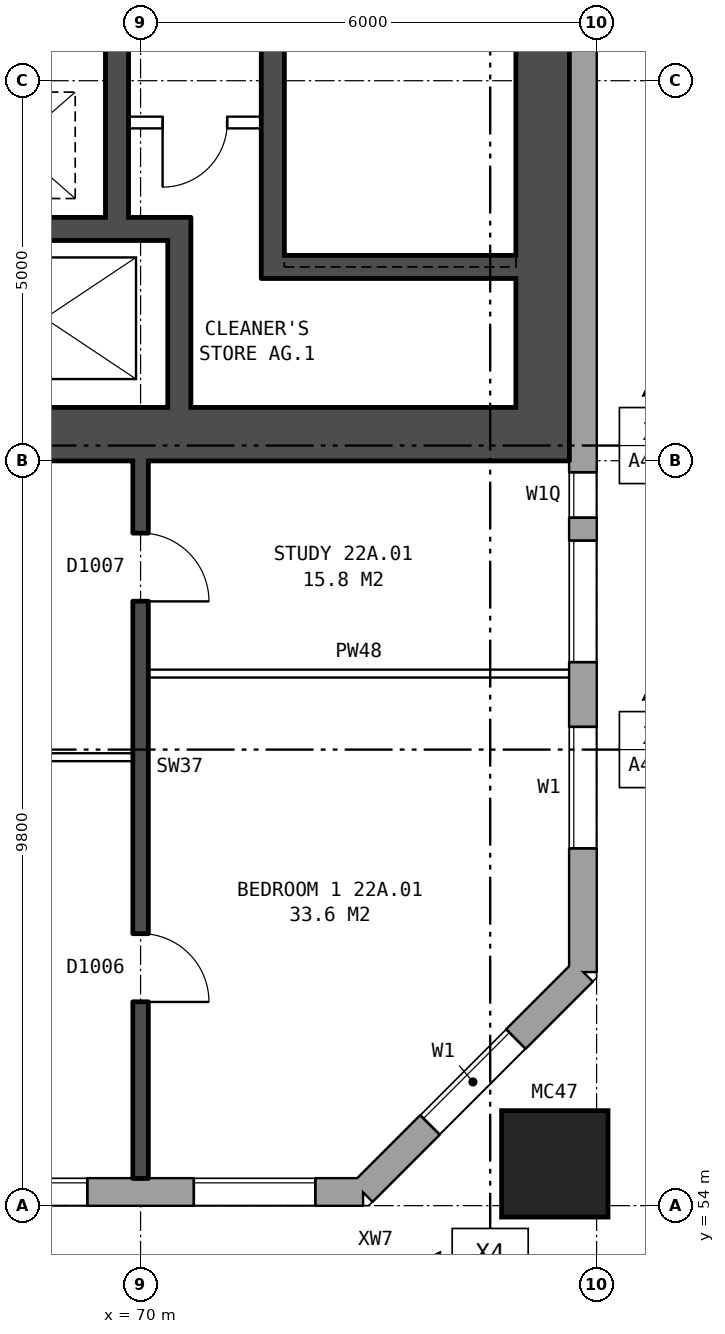
"""IFC4 building model, lengths in metres.
Left out: names, types, materials, properties, quantities, classifications, styles, units other than length and angle.
Written with IfcOpenShell. Run it as: python <this file> out.ifc"""

import sys

from ifc_helpers import new_model, si_unit, direction, frame, frame_2d, origin, origin_2d, place, context, subcontext, project, spatial, rectangle, hollow_rectangle, extrude, element, fill, save


model = new_model("IFC4")
c1 = context("Model", 3, precision=1e-05, world=origin(), true_north=direction((0.0, 1.0)))
c2 = subcontext(c1, "Body", "Model", "MODEL_VIEW")
j1 = project(units=[si_unit("LENGTHUNIT", "METRE"), si_unit("PLANEANGLEUNIT", "RADIAN")], contexts=[c1])
p1 = place(None, origin())
s1 = spatial("IfcSite", under=j1, at=p1, CompositionType="ELEMENT")
p2 = place(p1, origin())
s2 = spatial("IfcBuilding", under=s1, at=p2, CompositionType="ELEMENT")
p3 = place(p2, frame((0.0, 0.0, 80.9)))
s3 = spatial("IfcBuildingStorey", under=s2, at=p3, CompositionType="ELEMENT", Elevation=80.9)
p4 = place(p3, frame((75.45, 54.55, 0.0), z_axis=(0.0, 0.0, 1.0), x_axis=(1.0, 0.0, 0.0)))
e1 = element("IfcColumn", 1, at=p4, inside=s3, PredefinedType="COLUMN", context=c2, shape_type="SweptSolid", body=[
    extrude(hollow_rectangle(XDim=1.4, YDim=1.4, WallThickness=0.075, at=origin_2d()), origin(), (0.0, 0.0, 1.0), 3.1),
])
p5 = place(p3, frame((26.325, 54.18, 0.0), z_axis=(0.0, 0.0, 1.0), x_axis=(1.0, 0.0, 0.0)))
e2 = element("IfcWall", 2, at=p5, inside=s3, PredefinedType="STANDARD", context=c2, shape_type="SweptSolid", body=[
    extrude(rectangle(XDim=46.601, YDim=0.36, at=frame_2d((23.3, 0.0))), origin(), (0.0, 0.0, 1.0), 2.85),
])
p6 = place(p5, frame((2.375, 0.0, 0.8)))
e3 = element("IfcOpeningElement", 3, at=p6, cuts=e2, PredefinedType="OPENING", context=c2, shape_type="SweptSolid", body=[
    extrude(rectangle(XDim=1.6, YDim=1.8, at=frame_2d((0.8, 0.9))), frame((0.0, 0.19, 0.0), z_axis=(0.0, -1.0, 0.0), x_axis=(1.0, 0.0, 0.0)), (0.0, 0.0, 1.0), 0.38),
])
p7 = place(p5, frame((5.375, 0.0, 0.8)))
e4 = element("IfcOpeningElement", 4, at=p7, cuts=e2, PredefinedType="OPENING", context=c2, shape_type="SweptSolid", body=[
    extrude(rectangle(XDim=1.6, YDim=1.8, at=frame_2d((0.8, 0.9))), frame((0.0, 0.19, 0.0), z_axis=(0.0, -1.0, 0.0), x_axis=(1.0, 0.0, 0.0)), (0.0, 0.0, 1.0), 0.38),
])
p8 = place(p5, frame((8.375, 0.0, 0.8)))
e5 = element("IfcOpeningElement", 5, at=p8, cuts=e2, PredefinedType="OPENING", context=c2, shape_type="SweptSolid", body=[
    extrude(rectangle(XDim=1.6, YDim=1.8, at=frame_2d((0.8, 0.9))), frame((0.0, 0.19, 0.0), z_axis=(0.0, -1.0, 0.0), x_axis=(1.0, 0.0, 0.0)), (0.0, 0.0, 1.0), 0.38),
])
p9 = place(p5, frame((11.375, 0.0, 0.8)))
e6 = element("IfcOpeningElement", 6, at=p9, cuts=e2, PredefinedType="OPENING", context=c2, shape_type="SweptSolid", body=[
    extrude(rectangle(XDim=1.6, YDim=1.8, at=frame_2d((0.8, 0.9))), frame((0.0, 0.19, 0.0), z_axis=(0.0, -1.0, 0.0), x_axis=(1.0, 0.0, 0.0)), (0.0, 0.0, 1.0), 0.38),
])
p10 = place(p5, frame((15.875, 0.0, 0.8)))
e7 = element("IfcOpeningElement", 7, at=p10, cuts=e2, PredefinedType="OPENING", context=c2, shape_type="SweptSolid", body=[
    extrude(rectangle(XDim=1.2, YDim=1.2, at=frame_2d((0.6, 0.6))), frame((0.0, 0.19, 0.0), z_axis=(0.0, -1.0, 0.0), x_axis=(1.0, 0.0, 0.0)), (0.0, 0.0, 1.0), 0.38),
])
p11 = place(p5, frame((17.375, 0.0, 0.8)))
e8 = element("IfcOpeningElement", 8, at=p11, cuts=e2, PredefinedType="OPENING", context=c2, shape_type="SweptSolid", body=[
    extrude(rectangle(XDim=1.6, YDim=1.8, at=frame_2d((0.8, 0.9))), frame((0.0, 0.19, 0.0), z_axis=(0.0, -1.0, 0.0), x_axis=(1.0, 0.0, 0.0)), (0.0, 0.0, 1.0), 0.38),
])
p12 = place(p5, frame((20.375, 0.0, 0.8)))
e9 = element("IfcOpeningElement", 9, at=p12, cuts=e2, PredefinedType="OPENING", context=c2, shape_type="SweptSolid", body=[
    extrude(rectangle(XDim=1.6, YDim=1.8, at=frame_2d((0.8, 0.9))), frame((0.0, 0.19, 0.0), z_axis=(0.0, -1.0, 0.0), x_axis=(1.0, 0.0, 0.0)), (0.0, 0.0, 1.0), 0.38),
])
p13 = place(p5, frame((23.375, 0.0, 0.8)))
e10 = element("IfcOpeningElement", 10, at=p13, cuts=e2, PredefinedType="OPENING", context=c2, shape_type="SweptSolid", body=[
    extrude(rectangle(XDim=1.6, YDim=1.8, at=frame_2d((0.8, 0.9))), frame((0.0, 0.19, 0.0), z_axis=(0.0, -1.0, 0.0), x_axis=(1.0, 0.0, 0.0)), (0.0, 0.0, 1.0), 0.38),
])
p14 = place(p5, frame((26.375, 0.0, 0.8)))
e11 = element("IfcOpeningElement", 11, at=p14, cuts=e2, PredefinedType="OPENING", context=c2, shape_type="SweptSolid", body=[
    extrude(rectangle(XDim=1.6, YDim=1.8, at=frame_2d((0.8, 0.9))), frame((0.0, 0.19, 0.0), z_axis=(0.0, -1.0, 0.0), x_axis=(1.0, 0.0, 0.0)), (0.0, 0.0, 1.0), 0.38),
])
p15 = place(p5, frame((28.825, 0.0, 0.8)))
e12 = element("IfcOpeningElement", 12, at=p15, cuts=e2, PredefinedType="OPENING", context=c2, shape_type="SweptSolid", body=[
    extrude(rectangle(XDim=1.2, YDim=1.8, at=frame_2d((0.6, 0.9))), frame((0.0, 0.19, 0.0), z_axis=(0.0, -1.0, 0.0), x_axis=(1.0, 0.0, 0.0)), (0.0, 0.0, 1.0), 0.38),
])
p16 = place(p5, frame((32.375, 0.0, 1.7)))
e13 = element("IfcOpeningElement", 13, at=p16, cuts=e2, PredefinedType="OPENING", context=c2, shape_type="SweptSolid", body=[
    extrude(rectangle(XDim=0.8, YDim=0.9, at=frame_2d((0.4, 0.45))), frame((0.0, 0.19, 0.0), z_axis=(0.0, -1.0, 0.0), x_axis=(1.0, 0.0, 0.0)), (0.0, 0.0, 1.0), 0.38),
])
p17 = place(p5, frame((35.375, 0.0, 0.8)))
e14 = element("IfcOpeningElement", 14, at=p17, cuts=e2, PredefinedType="OPENING", context=c2, shape_type="SweptSolid", body=[
    extrude(rectangle(XDim=1.6, YDim=1.8, at=frame_2d((0.8, 0.9))), frame((0.0, 0.19, 0.0), z_axis=(0.0, -1.0, 0.0), x_axis=(1.0, 0.0, 0.0)), (0.0, 0.0, 1.0), 0.38),
])
p18 = place(p5, frame((38.375, 0.0, 0.8)))
e15 = element("IfcOpeningElement", 15, at=p18, cuts=e2, PredefinedType="OPENING", context=c2, shape_type="SweptSolid", body=[
    extrude(rectangle(XDim=1.6, YDim=1.8, at=frame_2d((0.8, 0.9))), frame((0.0, 0.19, 0.0), z_axis=(0.0, -1.0, 0.0), x_axis=(1.0, 0.0, 0.0)), (0.0, 0.0, 1.0), 0.38),
])
p19 = place(p5, frame((41.375, 0.0, 0.8)))
e16 = element("IfcOpeningElement", 16, at=p19, cuts=e2, PredefinedType="OPENING", context=c2, shape_type="SweptSolid", body=[
    extrude(rectangle(XDim=1.6, YDim=1.8, at=frame_2d((0.8, 0.9))), frame((0.0, 0.19, 0.0), z_axis=(0.0, -1.0, 0.0), x_axis=(1.0, 0.0, 0.0)), (0.0, 0.0, 1.0), 0.38),
])
p20 = place(p5, frame((44.375, 0.0, 0.8)))
e17 = element("IfcOpeningElement", 17, at=p20, cuts=e2, PredefinedType="OPENING", context=c2, shape_type="SweptSolid", body=[
    extrude(rectangle(XDim=1.6, YDim=1.8, at=frame_2d((0.8, 0.9))), frame((0.0, 0.19, 0.0), z_axis=(0.0, -1.0, 0.0), x_axis=(1.0, 0.0, 0.0)), (0.0, 0.0, 1.0), 0.38),
])
p21 = place(p5, frame((30.325, 0.0, 0.8)))
e18 = element("IfcOpeningElement", 18, at=p21, cuts=e2, PredefinedType="OPENING", context=c2, shape_type="SweptSolid", body=[
    extrude(rectangle(XDim=0.6, YDim=0.9, at=frame_2d((0.3, 0.45))), frame((0.0, 0.19, 0.0), z_axis=(0.0, -1.0, 0.0), x_axis=(1.0, 0.0, 0.0)), (0.0, 0.0, 1.0), 0.38),
])
p22 = place(p5, frame((33.475, 0.0, 0.8)))
e19 = element("IfcOpeningElement", 19, at=p22, cuts=e2, PredefinedType="OPENING", context=c2, shape_type="SweptSolid", body=[
    extrude(rectangle(XDim=1.0, YDim=1.8, at=frame_2d((0.5, 0.9))), frame((0.0, 0.19, 0.0), z_axis=(0.0, -1.0, 0.0), x_axis=(1.0, 0.0, 0.0)), (0.0, 0.0, 1.0), 0.38),
])
p23 = place(p3, frame((72.925, 54.18, 0.0), z_axis=(0.0, 0.0, 1.0), x_axis=(0.707106781187, 0.707106781187, 0.0)))
e20 = element("IfcWall", 20, at=p23, inside=s3, PredefinedType="STANDARD", context=c2, shape_type="SweptSolid", body=[
    extrude(rectangle(XDim=4.094, YDim=0.36, at=frame_2d((2.047, 0.0))), origin(), (0.0, 0.0, 1.0), 2.85),
])
p24 = place(p23, frame((1.247, 0.0, 0.8)))
e21 = element("IfcOpeningElement", 21, at=p24, cuts=e20, PredefinedType="OPENING", context=c2, shape_type="SweptSolid", body=[
    extrude(rectangle(XDim=1.6, YDim=1.8, at=frame_2d((0.8, 0.9))), frame((0.0, 0.19, 0.0), z_axis=(0.0, -1.0, 0.0), x_axis=(1.0, 0.0, 0.0)), (0.0, 0.0, 1.0), 0.38),
])
p25 = place(p3, frame((75.82, 57.075, 0.0), z_axis=(0.0, 0.0, 1.0), x_axis=(0.0, 1.0, 0.0)))
e22 = element("IfcWall", 22, at=p25, inside=s3, PredefinedType="STANDARD", context=c2, shape_type="SweptSolid", body=[
    extrude(rectangle(XDim=25.851, YDim=0.36, at=frame_2d((12.925, 0.0))), origin(), (0.0, 0.0, 1.0), 2.85),
])
p26 = place(p25, frame((1.625, 0.0, 0.8)))
e23 = element("IfcOpeningElement", 23, at=p26, cuts=e22, PredefinedType="OPENING", context=c2, shape_type="SweptSolid", body=[
    extrude(rectangle(XDim=1.6, YDim=1.8, at=frame_2d((0.8, 0.9))), frame((0.0, 0.19, 0.0), z_axis=(0.0, -1.0, 0.0), x_axis=(1.0, 0.0, 0.0)), (0.0, 0.0, 1.0), 0.38),
])
p27 = place(p25, frame((4.075, 0.0, 0.8)))
e24 = element("IfcOpeningElement", 24, at=p27, cuts=e22, PredefinedType="OPENING", context=c2, shape_type="SweptSolid", body=[
    extrude(rectangle(XDim=1.6, YDim=1.8, at=frame_2d((0.8, 0.9))), frame((0.0, 0.19, 0.0), z_axis=(0.0, -1.0, 0.0), x_axis=(1.0, 0.0, 0.0)), (0.0, 0.0, 1.0), 0.38),
])
p28 = place(p25, frame((19.225, 0.0, 0.8)))
e25 = element("IfcOpeningElement", 25, at=p28, cuts=e22, PredefinedType="OPENING", context=c2, shape_type="SweptSolid", body=[
    extrude(rectangle(XDim=0.6, YDim=1.2, at=frame_2d((0.3, 0.6))), frame((0.0, 0.19, 0.0), z_axis=(0.0, -1.0, 0.0), x_axis=(1.0, 0.0, 0.0)), (0.0, 0.0, 1.0), 0.38),
])
p29 = place(p25, frame((22.625, 0.0, 0.8)))
e26 = element("IfcOpeningElement", 26, at=p29, cuts=e22, PredefinedType="OPENING", context=c2, shape_type="SweptSolid", body=[
    extrude(rectangle(XDim=1.6, YDim=1.8, at=frame_2d((0.8, 0.9))), frame((0.0, 0.19, 0.0), z_axis=(0.0, -1.0, 0.0), x_axis=(1.0, 0.0, 0.0)), (0.0, 0.0, 1.0), 0.38),
])
p30 = place(p25, frame((5.975, 0.0, 0.8)))
e27 = element("IfcOpeningElement", 27, at=p30, cuts=e22, PredefinedType="OPENING", context=c2, shape_type="SweptSolid", body=[
    extrude(rectangle(XDim=0.6, YDim=1.2, at=frame_2d((0.3, 0.6))), frame((0.0, 0.19, 0.0), z_axis=(0.0, -1.0, 0.0), x_axis=(1.0, 0.0, 0.0)), (0.0, 0.0, 1.0), 0.38),
])
p31 = place(p25, frame((20.125, 0.0, 0.8)))
e28 = element("IfcOpeningElement", 28, at=p31, cuts=e22, PredefinedType="OPENING", context=c2, shape_type="SweptSolid", body=[
    extrude(rectangle(XDim=1.6, YDim=1.8, at=frame_2d((0.8, 0.9))), frame((0.0, 0.19, 0.0), z_axis=(0.0, -1.0, 0.0), x_axis=(1.0, 0.0, 0.0)), (0.0, 0.0, 1.0), 0.38),
])
p32 = place(p3, frame((75.29, 64.5, 0.0), z_axis=(0.0, 0.0, 1.0), x_axis=(0.0, 1.0, 0.0)))
e29 = element("IfcWall", 29, at=p32, inside=s3, PredefinedType="SHEAR", context=c2, shape_type="SweptSolid", body=[
    extrude(rectangle(XDim=11.0, YDim=0.7, at=frame_2d((5.5, 0.0))), origin(), (0.0, 0.0, 1.0), 2.85),
])
p33 = place(p3, frame((66.64, 64.15, 0.0), z_axis=(0.0, 0.0, 1.0), x_axis=(1.0, 0.0, 0.0)))
e30 = element("IfcWall", 30, at=p33, inside=s3, PredefinedType="SHEAR", context=c2, shape_type="SweptSolid", body=[
    extrude(rectangle(XDim=9.0, YDim=0.7, at=frame_2d((4.5, 0.0))), origin(), (0.0, 0.0, 1.0), 2.85),
])
p34 = place(p3, frame((71.89, 66.35, 0.0), z_axis=(0.0, 0.0, 1.0), x_axis=(1.0, 0.0, 0.0)))
e31 = element("IfcWall", 31, at=p34, inside=s3, PredefinedType="SHEAR", context=c2, shape_type="SweptSolid", body=[
    extrude(rectangle(XDim=3.05, YDim=0.3, at=frame_2d((1.525, 0.0))), origin(), (0.0, 0.0, 1.0), 2.85),
])
p35 = place(p3, frame((67.34, 66.85, 0.0), z_axis=(0.0, 0.0, 1.0), x_axis=(1.0, 0.0, 0.0)))
e32 = element("IfcWall", 32, at=p35, inside=s3, PredefinedType="SHEAR", context=c2, shape_type="SweptSolid", body=[
    extrude(rectangle(XDim=3.32, YDim=0.3, at=frame_2d((1.66, 0.0))), origin(), (0.0, 0.0, 1.0), 2.85),
])
p36 = place(p3, frame((69.84, 68.25, 0.0), z_axis=(0.0, 0.0, 1.0), x_axis=(1.0, 0.0, 0.0)))
e33 = element("IfcWall", 33, at=p36, inside=s3, PredefinedType="PARTITIONING", context=c2, shape_type="SweptSolid", body=[
    extrude(rectangle(XDim=1.75, YDim=0.15, at=frame_2d((0.875, 0.0))), origin(), (0.0, 0.0, 1.0), 2.85),
])
p37 = place(p36, frame((0.45, 0.0, 0.0)))
e34 = element("IfcOpeningElement", 34, at=p37, cuts=e33, PredefinedType="OPENING", context=c2, shape_type="SweptSolid", body=[
    extrude(rectangle(XDim=0.85, YDim=2.1, at=frame_2d((0.425, 1.05))), frame((0.0, 0.085, 0.0), z_axis=(0.0, -1.0, 0.0), x_axis=(1.0, 0.0, 0.0)), (0.0, 0.0, 1.0), 0.17),
])
p38 = place(p3, frame((69.69, 67.0, 0.0), z_axis=(0.0, 0.0, 1.0), x_axis=(0.0, 1.0, 0.0)))
e35 = element("IfcWall", 35, at=p38, inside=s3, PredefinedType="SHEAR", context=c2, shape_type="SweptSolid", body=[
    extrude(rectangle(XDim=6.6, YDim=0.3, at=frame_2d((3.3, 0.0))), origin(), (0.0, 0.0, 1.0), 2.85),
])
p39 = place(p3, frame((70.51, 64.5, 0.0), z_axis=(0.0, 0.0, 1.0), x_axis=(0.0, 1.0, 0.0)))
e36 = element("IfcWall", 36, at=p39, inside=s3, PredefinedType="SHEAR", context=c2, shape_type="SweptSolid", body=[
    extrude(rectangle(XDim=2.2, YDim=0.3, at=frame_2d((1.1, 0.0))), origin(), (0.0, 0.0, 1.0), 2.85),
])
p40 = place(p3, frame((71.74, 66.2, 0.0), z_axis=(0.0, 0.0, 1.0), x_axis=(0.0, 1.0, 0.0)))
e37 = element("IfcWall", 37, at=p40, inside=s3, PredefinedType="SHEAR", context=c2, shape_type="SweptSolid", body=[
    extrude(rectangle(XDim=7.4, YDim=0.3, at=frame_2d((3.7, 0.0))), origin(), (0.0, 0.0, 1.0), 2.85),
])
p41 = place(p3, frame((64.1, 59.9, 0.0), z_axis=(0.0, 0.0, 1.0), x_axis=(1.0, 0.0, 0.0)))
e38 = element("IfcWall", 38, at=p41, inside=s3, PredefinedType="PARTITIONING", context=c2, shape_type="SweptSolid", body=[
    extrude(rectangle(XDim=5.8, YDim=0.1, at=frame_2d((2.9, 0.0))), origin(), (0.0, 0.0, 1.0), 2.85),
])
p42 = place(p41, frame((3.6, 0.0, 0.0)))
e39 = element("IfcOpeningElement", 39, at=p42, cuts=e38, PredefinedType="OPENING", context=c2, shape_type="SweptSolid", body=[
    extrude(rectangle(XDim=0.9, YDim=2.1, at=frame_2d((0.45, 1.05))), frame((0.0, 0.06, 0.0), z_axis=(0.0, -1.0, 0.0), x_axis=(1.0, 0.0, 0.0)), (0.0, 0.0, 1.0), 0.12),
])
p43 = place(p41, frame((0.7, 0.0, 0.0)))
e40 = element("IfcOpeningElement", 40, at=p43, cuts=e38, PredefinedType="OPENING", context=c2, shape_type="SweptSolid", body=[
    extrude(rectangle(XDim=0.9, YDim=2.1, at=frame_2d((0.45, 1.05))), frame((0.0, 0.06, 0.0), z_axis=(0.0, -1.0, 0.0), x_axis=(1.0, 0.0, 0.0)), (0.0, 0.0, 1.0), 0.12),
])
p44 = place(p3, frame((70.1, 61.0, 0.0), z_axis=(0.0, 0.0, 1.0), x_axis=(1.0, 0.0, 0.0)))
e41 = element("IfcWall", 41, at=p44, inside=s3, PredefinedType="PARTITIONING", context=c2, shape_type="SweptSolid", body=[
    extrude(rectangle(XDim=5.54, YDim=0.1, at=frame_2d((2.77, 0.0))), origin(), (0.0, 0.0, 1.0), 2.85),
])
p45 = place(p3, frame((70.0, 54.36, 0.0), z_axis=(0.0, 0.0, 1.0), x_axis=(0.0, 1.0, 0.0)))
e42 = element("IfcWall", 42, at=p45, inside=s3, PredefinedType="SOLIDWALL", context=c2, shape_type="SweptSolid", body=[
    extrude(rectangle(XDim=9.44, YDim=0.2, at=frame_2d((4.72, 0.0))), origin(), (0.0, 0.0, 1.0), 2.85),
])
p46 = place(p45, frame((2.32, 0.0, 0.0)))
e43 = element("IfcOpeningElement", 43, at=p46, cuts=e42, PredefinedType="OPENING", context=c2, shape_type="SweptSolid", body=[
    extrude(rectangle(XDim=0.9, YDim=2.1, at=frame_2d((0.45, 1.05))), frame((0.0, 0.11, 0.0), z_axis=(0.0, -1.0, 0.0), x_axis=(1.0, 0.0, 0.0)), (0.0, 0.0, 1.0), 0.22),
])
p47 = place(p45, frame((7.59, 0.0, 0.0)))
e44 = element("IfcOpeningElement", 44, at=p47, cuts=e42, PredefinedType="OPENING", context=c2, shape_type="SweptSolid", body=[
    extrude(rectangle(XDim=0.9, YDim=2.1, at=frame_2d((0.45, 1.05))), frame((0.0, 0.11, 0.0), z_axis=(0.0, -1.0, 0.0), x_axis=(1.0, 0.0, 0.0)), (0.0, 0.0, 1.0), 0.22),
])
p48 = place(p19, origin())
e45 = element("IfcWindow", 45, at=p48, inside=s3, PartitioningType="SINGLE_PANEL", PredefinedType="WINDOW", context=c2, shape_type="SweptSolid", body=[
    extrude(rectangle(XDim=1.6, YDim=1.8, at=frame_2d((0.8, 0.9))), frame((0.0, 0.15, 0.0), z_axis=(0.0, -1.0, 0.0), x_axis=(1.0, 0.0, 0.0)), (0.0, 0.0, 1.0), 0.06),
])
fill(e16, e45)
p49 = place(p20, origin())
e46 = element("IfcWindow", 46, at=p49, inside=s3, PartitioningType="SINGLE_PANEL", PredefinedType="WINDOW", context=c2, shape_type="SweptSolid", body=[
    extrude(rectangle(XDim=1.6, YDim=1.8, at=frame_2d((0.8, 0.9))), frame((0.0, 0.15, 0.0), z_axis=(0.0, -1.0, 0.0), x_axis=(1.0, 0.0, 0.0)), (0.0, 0.0, 1.0), 0.06),
])
fill(e17, e46)
p50 = place(p24, origin())
e47 = element("IfcWindow", 47, at=p50, inside=s3, PartitioningType="SINGLE_PANEL", PredefinedType="WINDOW", context=c2, shape_type="SweptSolid", body=[
    extrude(rectangle(XDim=1.6, YDim=1.8, at=frame_2d((0.8, 0.9))), frame((0.0, 0.15, 0.0), z_axis=(0.0, -1.0, 0.0), x_axis=(1.0, 0.0, 0.0)), (0.0, 0.0, 1.0), 0.06),
])
fill(e21, e47)
p51 = place(p26, origin())
e48 = element("IfcWindow", 48, at=p51, inside=s3, PartitioningType="SINGLE_PANEL", PredefinedType="WINDOW", context=c2, shape_type="SweptSolid", body=[
    extrude(rectangle(XDim=1.6, YDim=1.8, at=frame_2d((0.8, 0.9))), frame((0.0, 0.15, 0.0), z_axis=(0.0, -1.0, 0.0), x_axis=(1.0, 0.0, 0.0)), (0.0, 0.0, 1.0), 0.06),
])
fill(e23, e48)
p52 = place(p27, origin())
e49 = element("IfcWindow", 49, at=p52, inside=s3, PartitioningType="SINGLE_PANEL", PredefinedType="WINDOW", context=c2, shape_type="SweptSolid", body=[
    extrude(rectangle(XDim=1.6, YDim=1.8, at=frame_2d((0.8, 0.9))), frame((0.0, 0.15, 0.0), z_axis=(0.0, -1.0, 0.0), x_axis=(1.0, 0.0, 0.0)), (0.0, 0.0, 1.0), 0.06),
])
fill(e24, e49)
p53 = place(p37, frame((0.85, 0.0, 0.0), z_axis=(0.0, 0.0, 1.0), x_axis=(-1.0, 0.0, 0.0)))
e50 = element("IfcDoor", 50, at=p53, inside=s3, OperationType="SINGLE_SWING_RIGHT", PredefinedType="DOOR", context=c2, shape_type="SweptSolid", body=[
    extrude(rectangle(XDim=0.85, YDim=2.1, at=frame_2d((0.425, 1.05))), frame((0.0, 0.025, 0.0), z_axis=(0.0, -1.0, 0.0), x_axis=(1.0, 0.0, 0.0)), (0.0, 0.0, 1.0), 0.05),
])
fill(e34, e50)
p54 = place(p46, frame((0.9, 0.0, 0.0), z_axis=(0.0, 0.0, 1.0), x_axis=(-1.0, 0.0, 0.0)))
e51 = element("IfcDoor", 51, at=p54, inside=s3, OperationType="SINGLE_SWING_RIGHT", PredefinedType="DOOR", context=c2, shape_type="SweptSolid", body=[
    extrude(rectangle(XDim=0.9, YDim=2.1, at=frame_2d((0.45, 1.05))), frame((0.0, 0.025, 0.0), z_axis=(0.0, -1.0, 0.0), x_axis=(1.0, 0.0, 0.0)), (0.0, 0.0, 1.0), 0.05),
])
fill(e43, e51)
p55 = place(p47, frame((0.9, 0.0, 0.0), z_axis=(0.0, 0.0, 1.0), x_axis=(-1.0, 0.0, 0.0)))
e52 = element("IfcDoor", 52, at=p55, inside=s3, OperationType="SINGLE_SWING_RIGHT", PredefinedType="DOOR", context=c2, shape_type="SweptSolid", body=[
    extrude(rectangle(XDim=0.9, YDim=2.1, at=frame_2d((0.45, 1.05))), frame((0.0, 0.025, 0.0), z_axis=(0.0, -1.0, 0.0), x_axis=(1.0, 0.0, 0.0)), (0.0, 0.0, 1.0), 0.05),
])
fill(e44, e52)
p56 = place(p30, origin())
e53 = element("IfcWindow", 53, at=p56, inside=s3, PartitioningType="SINGLE_PANEL", PredefinedType="WINDOW", context=c2, shape_type="SweptSolid", body=[
    extrude(rectangle(XDim=0.6, YDim=1.2, at=frame_2d((0.3, 0.6))), frame((0.0, 0.15, 0.0), z_axis=(0.0, -1.0, 0.0), x_axis=(1.0, 0.0, 0.0)), (0.0, 0.0, 1.0), 0.06),
])
fill(e27, e53)
save(model, sys.argv[1])
